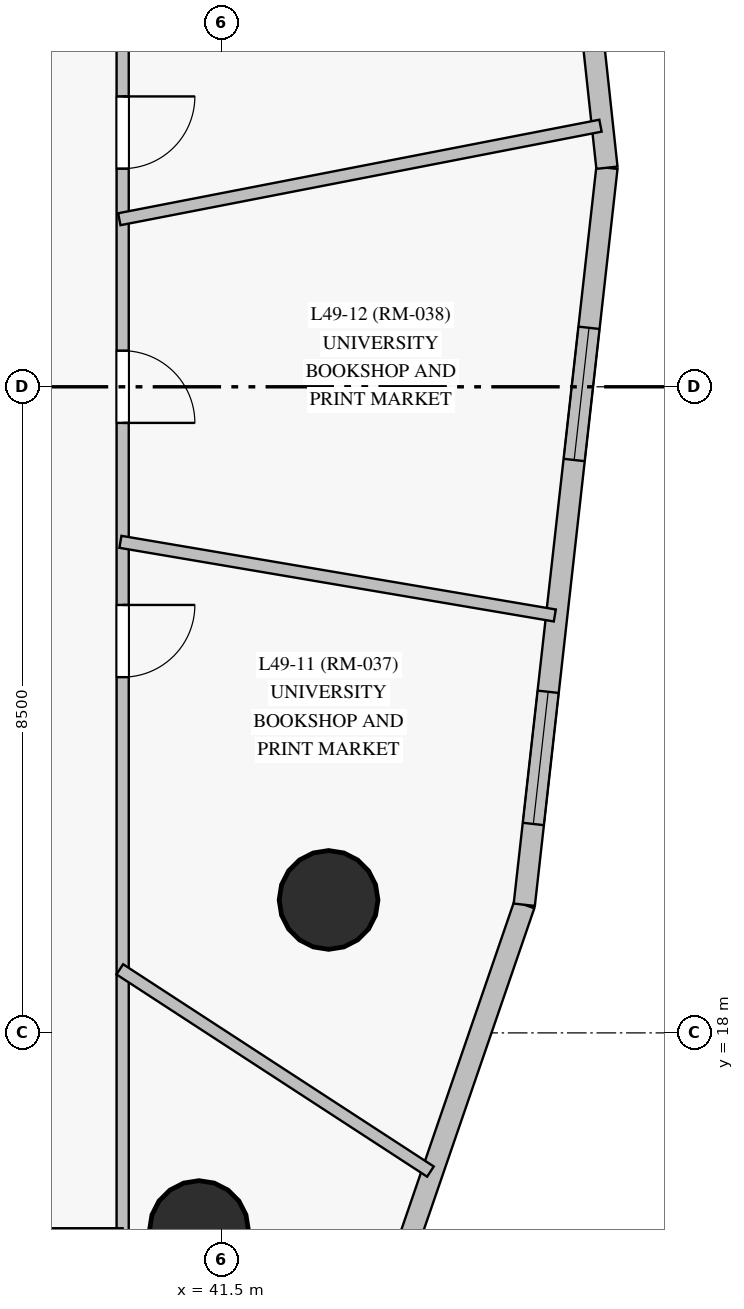
"""IFC4 building model, lengths in metres.
Left out: names, types, materials, properties, quantities, classifications, styles, units other than length and angle.
Written with IfcOpenShell. Run it as: python <this file> out.ifc"""

import sys

from ifc_helpers import new_model, si_unit, direction, frame, frame_2d, origin, origin_with_axes, origin_2d, place, context, subcontext, project, spatial, rectangle, circle, extrude, source, transform, mapped, element, fill, save


model = new_model("IFC4")
c1 = context("Model", 3, precision=1e-05, world=origin(), true_north=direction((0.0, 1.0)))
c2 = subcontext(c1, "Body", "Model", "MODEL_VIEW")
j1 = project(units=[si_unit("LENGTHUNIT", "METRE"), si_unit("PLANEANGLEUNIT", "RADIAN")], contexts=[c1])
p1 = place(None, origin())
s1 = spatial("IfcSite", under=j1, at=p1, CompositionType="ELEMENT")
p2 = place(p1, origin())
s2 = spatial("IfcBuilding", under=s1, at=p2, CompositionType="ELEMENT")
p3 = place(p2, frame((0.0, 0.0, 171.8)))
s3 = spatial("IfcBuildingStorey", under=s2, at=p3, CompositionType="ELEMENT", Elevation=171.8)
m1 = source(origin_with_axes(), c2, "Body", "SweptSolid", [
    extrude(circle(Radius=0.65, at=origin_2d()), origin(), (0.0, 0.0, 1.0), 3.05),
])
for number, where, z_axis, x_axis in (
    (1, (42.909, 19.749, 0.0), (0.0, 0.0, 1.0), (1.0, 0.0, 0.0)),
    (2, (41.204, 15.406, 0.0), (0.0, 0.0, 1.0), (1.0, 0.0, 0.0)),
):
    element("IfcColumn", number, at=place(p3, frame(where, z_axis=z_axis, x_axis=x_axis)), inside=s3, PredefinedType="COLUMN", context=c2, shape_type="MappedRepresentation", body=[
        mapped(m1, transform((0.0, 0.0, 0.0), scale=1.0)),
    ])
p4 = place(p3, frame((42.625, 11.367, 0.0), z_axis=(0.0, 0.0, 1.0), x_axis=(0.324982030771, 0.945720191006, 0.0)))
e3 = element("IfcWall", 3, at=p4, inside=s3, PredefinedType="SOLIDWALL", context=c2, shape_type="SweptSolid", body=[
    extrude(rectangle(XDim=8.796, YDim=0.28, at=frame_2d((4.398, 0.0))), origin(), (0.0, 0.0, 1.0), 2.495),
])
p5 = place(p3, frame((45.484, 19.686, 0.0), z_axis=(0.0, 0.0, 1.0), x_axis=(0.111472313182, 0.993767539918, 0.0)))
e4 = element("IfcWall", 4, at=p5, inside=s3, PredefinedType="SOLIDWALL", context=c2, shape_type="SweptSolid", body=[
    extrude(rectangle(XDim=9.757, YDim=0.28, at=frame_2d((4.878, 0.0))), origin(), (0.0, 0.0, 1.0), 2.825),
])
p6 = place(p5, frame((1.069, 0.0, 0.85)))
e5 = element("IfcOpeningElement", 5, at=p6, cuts=e4, PredefinedType="OPENING", context=c2, shape_type="SweptSolid", body=[
    extrude(rectangle(XDim=1.75, YDim=1.65, at=frame_2d((0.875, 0.825))), frame((0.0, 0.15, 0.0), z_axis=(0.0, -1.0, 0.0), x_axis=(1.0, 0.0, 0.0)), (0.0, 0.0, 1.0), 0.3),
])
p7 = place(p5, frame((5.888, 0.0, 0.85)))
e6 = element("IfcOpeningElement", 6, at=p7, cuts=e4, PredefinedType="OPENING", context=c2, shape_type="SweptSolid", body=[
    extrude(rectangle(XDim=1.75, YDim=1.65, at=frame_2d((0.875, 0.825))), frame((0.0, 0.15, 0.0), z_axis=(0.0, -1.0, 0.0), x_axis=(1.0, 0.0, 0.0)), (0.0, 0.0, 1.0), 0.3),
])
p8 = place(p3, frame((46.571, 29.382, 0.0), z_axis=(0.0, 0.0, 1.0), x_axis=(-0.107380334405, 0.994218016223, 0.0)))
e7 = element("IfcWall", 7, at=p8, inside=s3, PredefinedType="SOLIDWALL", context=c2, shape_type="SweptSolid", body=[
    extrude(rectangle(XDim=14.071, YDim=0.28, at=frame_2d((7.036, 0.0))), origin(), (0.0, 0.0, 1.0), 2.825),
])
p9 = place(p8, frame((3.114, 0.0, 0.85)))
e8 = element("IfcOpeningElement", 8, at=p9, cuts=e7, PredefinedType="OPENING", context=c2, shape_type="SweptSolid", body=[
    extrude(rectangle(XDim=1.75, YDim=1.65, at=frame_2d((0.875, 0.825))), frame((0.0, 0.15, 0.0), z_axis=(0.0, -1.0, 0.0), x_axis=(1.0, 0.0, 0.0)), (0.0, 0.0, 1.0), 0.3),
])
p10 = place(p8, frame((9.473, 0.0, 0.85)))
e9 = element("IfcOpeningElement", 9, at=p10, cuts=e7, PredefinedType="OPENING", context=c2, shape_type="SweptSolid", body=[
    extrude(rectangle(XDim=1.75, YDim=1.65, at=frame_2d((0.875, 0.825))), frame((0.0, 0.15, 0.0), z_axis=(0.0, -1.0, 0.0), x_axis=(1.0, 0.0, 0.0)), (0.0, 0.0, 1.0), 0.3),
])
p11 = place(p3, frame((40.2, 37.65, 0.0), z_axis=(0.0, 0.0, 1.0), x_axis=(0.0, -1.0, 0.0)))
e10 = element("IfcWall", 10, at=p11, inside=s3, PredefinedType="PARTITIONING", context=c2, shape_type="SweptSolid", body=[
    extrude(rectangle(XDim=22.3, YDim=0.16, at=frame_2d((11.15, 0.0))), origin(), (0.0, 0.0, 1.0), 2.375),
])
p12 = place(p11, frame((14.02, 0.0, 0.0)))
e11 = element("IfcOpeningElement", 11, at=p12, cuts=e10, PredefinedType="OPENING", context=c2, shape_type="SweptSolid", body=[
    extrude(rectangle(XDim=0.95, YDim=2.15, at=frame_2d((0.475, 1.075))), frame((0.0, 0.09, 0.0), z_axis=(0.0, -1.0, 0.0), x_axis=(1.0, 0.0, 0.0)), (0.0, 0.0, 1.0), 0.18),
])
p13 = place(p11, frame((10.675, 0.0, 0.0)))
e12 = element("IfcOpeningElement", 12, at=p13, cuts=e10, PredefinedType="OPENING", context=c2, shape_type="SweptSolid", body=[
    extrude(rectangle(XDim=0.95, YDim=2.15, at=frame_2d((0.475, 1.075))), frame((0.0, 0.09, 0.0), z_axis=(0.0, -1.0, 0.0), x_axis=(1.0, 0.0, 0.0)), (0.0, 0.0, 1.0), 0.18),
])
p14 = place(p11, frame((7.33, 0.0, 0.0)))
e13 = element("IfcOpeningElement", 13, at=p14, cuts=e10, PredefinedType="OPENING", context=c2, shape_type="SweptSolid", body=[
    extrude(rectangle(XDim=0.95, YDim=2.15, at=frame_2d((0.475, 1.075))), frame((0.0, 0.09, 0.0), z_axis=(0.0, -1.0, 0.0), x_axis=(1.0, 0.0, 0.0)), (0.0, 0.0, 1.0), 0.18),
])
p15 = place(p3, frame((40.2, 15.35, 0.0), z_axis=(0.0, 0.0, 1.0), x_axis=(-1.0, 0.0, 0.0)))
e14 = element("IfcWall", 14, at=p15, inside=s3, PredefinedType="PARTITIONING", context=c2, shape_type="SweptSolid", body=[
    extrude(rectangle(XDim=10.65, YDim=0.16, at=frame_2d((5.325, 0.0))), origin(), (0.0, 0.0, 1.0), 2.275),
])
p16 = place(p15, frame((4.85, 0.0, 0.0)))
e15 = element("IfcOpeningElement", 15, at=p16, cuts=e14, PredefinedType="OPENING", context=c2, shape_type="SweptSolid", body=[
    extrude(rectangle(XDim=0.95, YDim=2.15, at=frame_2d((0.475, 1.075))), frame((0.0, 0.09, 0.0), z_axis=(0.0, -1.0, 0.0), x_axis=(1.0, 0.0, 0.0)), (0.0, 0.0, 1.0), 0.18),
])
p17 = place(p15, frame((1.897, 0.0, 0.0)))
e16 = element("IfcOpeningElement", 16, at=p17, cuts=e14, PredefinedType="OPENING", context=c2, shape_type="SweptSolid", body=[
    extrude(rectangle(XDim=0.95, YDim=2.15, at=frame_2d((0.475, 1.075))), frame((0.0, 0.09, 0.0), z_axis=(0.0, -1.0, 0.0), x_axis=(1.0, 0.0, 0.0)), (0.0, 0.0, 1.0), 0.18),
])
p18 = place(p3, frame((40.156, 28.705, 0.0), z_axis=(0.0, 0.0, 1.0), x_axis=(0.981627800611, 0.19080582032, 0.0)))
e17 = element("IfcWall", 17, at=p18, inside=s3, PredefinedType="PARTITIONING", context=c2, shape_type="SweptSolid", body=[
    extrude(rectangle(XDim=6.449, YDim=0.16, at=frame_2d((3.224, 0.0))), origin(), (0.0, 0.0, 1.0), 2.825),
])
p19 = place(p3, frame((40.17, 24.46, 0.0), z_axis=(0.0, 0.0, 1.0), x_axis=(0.985927852307, -0.167171379264, 0.0)))
e18 = element("IfcWall", 18, at=p19, inside=s3, PredefinedType="PARTITIONING", context=c2, shape_type="SweptSolid", body=[
    extrude(rectangle(XDim=5.796, YDim=0.16, at=frame_2d((2.898, 0.0))), origin(), (0.0, 0.0, 1.0), 2.825),
])
p20 = place(p3, frame((40.162, 18.836, 0.0), z_axis=(0.0, 0.0, 1.0), x_axis=(0.838039609879, -0.545609395332, 0.0)))
e19 = element("IfcWall", 19, at=p20, inside=s3, PredefinedType="PARTITIONING", context=c2, shape_type="SweptSolid", body=[
    extrude(rectangle(XDim=4.876, YDim=0.16, at=frame_2d((2.438, 0.0))), origin(), (0.0, 0.0, 1.0), 2.825),
])
m2 = source(origin_with_axes(), c2, "Body", "SweptSolid", [
    extrude(rectangle(XDim=1.75, YDim=1.65, at=frame_2d((0.875, 0.825))), frame((0.0, 0.03, 0.0), z_axis=(0.0, -1.0, 0.0), x_axis=(1.0, 0.0, 0.0)), (0.0, 0.0, 1.0), 0.06),
])
p21 = place(p6, origin())
e20 = element("IfcWindow", 20, at=p21, inside=s3, PartitioningType="SINGLE_PANEL", PredefinedType="WINDOW", context=c2, shape_type="MappedRepresentation", body=[
    mapped(m2, transform((0.0, 0.0, 0.0), scale=1.0)),
])
fill(e5, e20)
p22 = place(p7, origin())
e21 = element("IfcWindow", 21, at=p22, inside=s3, PartitioningType="SINGLE_PANEL", PredefinedType="WINDOW", context=c2, shape_type="MappedRepresentation", body=[
    mapped(m2, transform((0.0, 0.0, 0.0), scale=1.0)),
])
fill(e6, e21)
m3 = source(origin_with_axes(), c2, "Body", "SweptSolid", [
    extrude(rectangle(XDim=0.95, YDim=2.15, at=frame_2d((0.475, 1.075))), frame((0.0, 0.025, 0.0), z_axis=(0.0, -1.0, 0.0), x_axis=(1.0, 0.0, 0.0)), (0.0, 0.0, 1.0), 0.05),
])
p23 = place(p12, origin())
e22 = element("IfcDoor", 22, at=p23, inside=s3, OperationType="SINGLE_SWING_LEFT", PredefinedType="DOOR", context=c2, shape_type="MappedRepresentation", body=[
    mapped(m3, transform((0.0, 0.0, 0.0), scale=1.0)),
])
fill(e11, e22)
p24 = place(p13, origin())
e23 = element("IfcDoor", 23, at=p24, inside=s3, OperationType="SINGLE_SWING_RIGHT", PredefinedType="DOOR", context=c2, shape_type="MappedRepresentation", body=[
    mapped(m3, transform((0.0, 0.0, 0.0), scale=1.0)),
])
fill(e12, e23)
p25 = place(p14, origin())
e24 = element("IfcDoor", 24, at=p25, inside=s3, OperationType="SINGLE_SWING_LEFT", PredefinedType="DOOR", context=c2, shape_type="MappedRepresentation", body=[
    mapped(m3, transform((0.0, 0.0, 0.0), scale=1.0)),
])
fill(e13, e24)
save(model, sys.argv[1])
